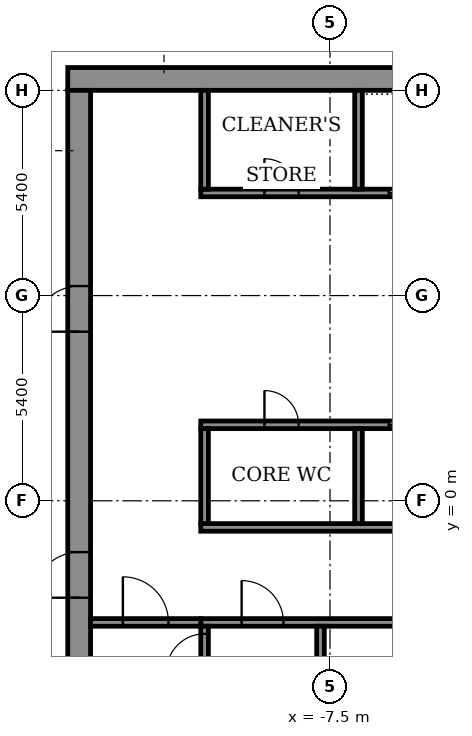
"""IFC4 building model, lengths in metres.
Left out: names, types, materials, properties, quantities, classifications, styles, units other than length and angle.
Written with IfcOpenShell. Run it as: python <this file> out.ifc"""

import sys

from ifc_helpers import new_model, si_unit, direction, frame, frame_2d, origin, place, context, subcontext, project, spatial, rectangle, extrude, element, fill, save


model = new_model("IFC4")
c1 = context("Model", 3, precision=1e-05, world=origin(), true_north=direction((0.0, 1.0)))
c2 = subcontext(c1, "Body", "Model", "MODEL_VIEW")
j1 = project(units=[si_unit("LENGTHUNIT", "METRE"), si_unit("PLANEANGLEUNIT", "RADIAN")], contexts=[c1])
p1 = place(None, origin())
s1 = spatial("IfcSite", under=j1, at=p1, CompositionType="ELEMENT")
p2 = place(p1, origin())
s2 = spatial("IfcBuilding", under=s1, at=p2, CompositionType="ELEMENT")
p3 = place(p2, frame((0.0, 0.0, 324.1)))
s3 = spatial("IfcBuildingStorey", under=s2, at=p3, CompositionType="ELEMENT", Elevation=324.1)
p4 = place(p3, frame((-14.4, 11.1, 0.0), z_axis=(0.0, 0.0, 1.0), x_axis=(1.0, 0.0, 0.0)))
e1 = element("IfcWall", 1, at=p4, inside=s3, PredefinedType="SHEAR", context=c2, shape_type="SweptSolid", body=[
    extrude(rectangle(XDim=28.8, YDim=0.6, at=frame_2d((14.4, 0.0))), origin(), (0.0, 0.0, 1.0), 5.6),
])
p5 = place(p3, frame((-14.1, -10.8, 0.0), z_axis=(0.0, 0.0, 1.0), x_axis=(0.0, 1.0, 0.0)))
e2 = element("IfcWall", 2, at=p5, inside=s3, PredefinedType="SHEAR", context=c2, shape_type="SweptSolid", body=[
    extrude(rectangle(XDim=21.6, YDim=0.6, at=frame_2d((10.8, 0.0))), origin(), (0.0, 0.0, 1.0), 5.6),
])
p6 = place(p5, frame((8.25, 0.0, 0.0)))
e3 = element("IfcOpeningElement", 3, at=p6, cuts=e2, PredefinedType="OPENING", context=c2, shape_type="SweptSolid", body=[
    extrude(rectangle(XDim=1.2, YDim=2.1, at=frame_2d((0.6, 1.05))), frame((0.0, 0.31, 0.0), z_axis=(0.0, -1.0, 0.0), x_axis=(1.0, 0.0, 0.0)), (0.0, 0.0, 1.0), 0.62),
])
p7 = place(p5, frame((15.25, 0.0, 0.0)))
e4 = element("IfcOpeningElement", 4, at=p7, cuts=e2, PredefinedType="OPENING", context=c2, shape_type="SweptSolid", body=[
    extrude(rectangle(XDim=1.2, YDim=2.1, at=frame_2d((0.6, 1.05))), frame((0.0, 0.31, 0.0), z_axis=(0.0, -1.0, 0.0), x_axis=(1.0, 0.0, 0.0)), (0.0, 0.0, 1.0), 0.62),
])
p8 = place(p5, frame((3.2, 0.0, 0.0)))
e5 = element("IfcOpeningElement", 5, at=p8, cuts=e2, PredefinedType="OPENING", context=c2, shape_type="SweptSolid", body=[
    extrude(rectangle(XDim=1.2, YDim=2.1, at=frame_2d((0.6, 1.05))), frame((0.0, 0.31, 0.0), z_axis=(0.0, -1.0, 0.0), x_axis=(1.0, 0.0, 0.0)), (0.0, 0.0, 1.0), 0.62),
])
p9 = place(p3, frame((-10.9, -3.2, 0.0), z_axis=(0.0, 0.0, 1.0), x_axis=(1.0, 0.0, 0.0)))
e6 = element("IfcWall", 6, at=p9, inside=s3, PredefinedType="SHEAR", context=c2, shape_type="SweptSolid", body=[
    extrude(rectangle(XDim=21.8, YDim=0.2, at=frame_2d((10.9, 0.0))), origin(), (0.0, 0.0, 1.0), 5.05),
])
p10 = place(p9, frame((1.075, 0.0, 0.0)))
e7 = element("IfcOpeningElement", 7, at=p10, cuts=e6, PredefinedType="OPENING", context=c2, shape_type="SweptSolid", body=[
    extrude(rectangle(XDim=1.1, YDim=2.1, at=frame_2d((0.55, 1.05))), frame((0.0, 0.11, 0.0), z_axis=(0.0, -1.0, 0.0), x_axis=(1.0, 0.0, 0.0)), (0.0, 0.0, 1.0), 0.22),
])
p11 = place(p9, frame((10.325, 0.0, 0.0)))
e8 = element("IfcOpeningElement", 8, at=p11, cuts=e6, PredefinedType="OPENING", context=c2, shape_type="SweptSolid", body=[
    extrude(rectangle(XDim=1.1, YDim=2.1, at=frame_2d((0.55, 1.05))), frame((0.0, 0.11, 0.0), z_axis=(0.0, -1.0, 0.0), x_axis=(1.0, 0.0, 0.0)), (0.0, 0.0, 1.0), 0.22),
])
p12 = place(p9, frame((19.625, 0.0, 0.0)))
e9 = element("IfcOpeningElement", 9, at=p12, cuts=e6, PredefinedType="OPENING", context=c2, shape_type="SweptSolid", body=[
    extrude(rectangle(XDim=1.1, YDim=2.1, at=frame_2d((0.55, 1.05))), frame((0.0, 0.11, 0.0), z_axis=(0.0, -1.0, 0.0), x_axis=(1.0, 0.0, 0.0)), (0.0, 0.0, 1.0), 0.22),
])
p13 = place(p9, frame((5.7, 0.0, 0.0)))
e10 = element("IfcOpeningElement", 10, at=p13, cuts=e6, PredefinedType="OPENING", context=c2, shape_type="SweptSolid", body=[
    extrude(rectangle(XDim=1.1, YDim=2.1, at=frame_2d((0.55, 1.05))), frame((0.0, 0.11, 0.0), z_axis=(0.0, -1.0, 0.0), x_axis=(1.0, 0.0, 0.0)), (0.0, 0.0, 1.0), 0.22),
])
p14 = place(p9, frame((14.975, 0.0, 0.0)))
e11 = element("IfcOpeningElement", 11, at=p14, cuts=e6, PredefinedType="OPENING", context=c2, shape_type="SweptSolid", body=[
    extrude(rectangle(XDim=1.1, YDim=2.1, at=frame_2d((0.55, 1.05))), frame((0.0, 0.11, 0.0), z_axis=(0.0, -1.0, 0.0), x_axis=(1.0, 0.0, 0.0)), (0.0, 0.0, 1.0), 0.22),
])
p15 = place(p3, frame((-10.9, -0.7, 0.0), z_axis=(0.0, 0.0, 1.0), x_axis=(1.0, 0.0, 0.0)))
e12 = element("IfcWall", 12, at=p15, inside=s3, PredefinedType="SHEAR", context=c2, shape_type="SweptSolid", body=[
    extrude(rectangle(XDim=21.8, YDim=0.2, at=frame_2d((10.9, 0.0))), origin(), (0.0, 0.0, 1.0), 5.05),
])
p16 = place(p3, frame((-10.9, 2.0, 0.0), z_axis=(0.0, 0.0, 1.0), x_axis=(1.0, 0.0, 0.0)))
e13 = element("IfcWall", 13, at=p16, inside=s3, PredefinedType="SHEAR", context=c2, shape_type="SweptSolid", body=[
    extrude(rectangle(XDim=21.8, YDim=0.2, at=frame_2d((10.9, 0.0))), origin(), (0.0, 0.0, 1.0), 5.05),
])
p17 = place(p16, frame((4.95, 0.0, 0.0)))
e14 = element("IfcOpeningElement", 14, at=p17, cuts=e13, PredefinedType="OPENING", context=c2, shape_type="SweptSolid", body=[
    extrude(rectangle(XDim=1.1, YDim=2.1, at=frame_2d((0.55, 1.05))), frame((0.0, 0.11, 0.0), z_axis=(0.0, -1.0, 0.0), x_axis=(1.0, 0.0, 0.0)), (0.0, 0.0, 1.0), 0.22),
])
p18 = place(p16, frame((7.65, 0.0, 0.0)))
e15 = element("IfcOpeningElement", 15, at=p18, cuts=e13, PredefinedType="OPENING", context=c2, shape_type="SweptSolid", body=[
    extrude(rectangle(XDim=1.1, YDim=2.1, at=frame_2d((0.55, 1.05))), frame((0.0, 0.11, 0.0), z_axis=(0.0, -1.0, 0.0), x_axis=(1.0, 0.0, 0.0)), (0.0, 0.0, 1.0), 0.22),
])
p19 = place(p16, frame((10.35, 0.0, 0.0)))
e16 = element("IfcOpeningElement", 16, at=p19, cuts=e13, PredefinedType="OPENING", context=c2, shape_type="SweptSolid", body=[
    extrude(rectangle(XDim=1.1, YDim=2.1, at=frame_2d((0.55, 1.05))), frame((0.0, 0.11, 0.0), z_axis=(0.0, -1.0, 0.0), x_axis=(1.0, 0.0, 0.0)), (0.0, 0.0, 1.0), 0.22),
])
p20 = place(p16, frame((1.675, 0.0, 0.0)))
e17 = element("IfcOpeningElement", 17, at=p20, cuts=e13, PredefinedType="OPENING", context=c2, shape_type="SweptSolid", body=[
    extrude(rectangle(XDim=0.9, YDim=2.1, at=frame_2d((0.45, 1.05))), frame((0.0, 0.11, 0.0), z_axis=(0.0, -1.0, 0.0), x_axis=(1.0, 0.0, 0.0)), (0.0, 0.0, 1.0), 0.22),
])
p21 = place(p16, frame((16.525, 0.0, 0.0)))
e18 = element("IfcOpeningElement", 18, at=p21, cuts=e13, PredefinedType="OPENING", context=c2, shape_type="SweptSolid", body=[
    extrude(rectangle(XDim=0.9, YDim=2.1, at=frame_2d((0.45, 1.05))), frame((0.0, 0.11, 0.0), z_axis=(0.0, -1.0, 0.0), x_axis=(1.0, 0.0, 0.0)), (0.0, 0.0, 1.0), 0.22),
])
p22 = place(p3, frame((-10.9, 8.1, 0.0), z_axis=(0.0, 0.0, 1.0), x_axis=(1.0, 0.0, 0.0)))
e19 = element("IfcWall", 19, at=p22, inside=s3, PredefinedType="SHEAR", context=c2, shape_type="SweptSolid", body=[
    extrude(rectangle(XDim=21.8, YDim=0.2, at=frame_2d((10.9, 0.0))), origin(), (0.0, 0.0, 1.0), 5.05),
])
p23 = place(p22, frame((4.95, 0.0, 0.0)))
e20 = element("IfcOpeningElement", 20, at=p23, cuts=e19, PredefinedType="OPENING", context=c2, shape_type="SweptSolid", body=[
    extrude(rectangle(XDim=1.1, YDim=2.1, at=frame_2d((0.55, 1.05))), frame((0.0, 0.11, 0.0), z_axis=(0.0, -1.0, 0.0), x_axis=(1.0, 0.0, 0.0)), (0.0, 0.0, 1.0), 0.22),
])
p24 = place(p22, frame((7.65, 0.0, 0.0)))
e21 = element("IfcOpeningElement", 21, at=p24, cuts=e19, PredefinedType="OPENING", context=c2, shape_type="SweptSolid", body=[
    extrude(rectangle(XDim=1.1, YDim=2.1, at=frame_2d((0.55, 1.05))), frame((0.0, 0.11, 0.0), z_axis=(0.0, -1.0, 0.0), x_axis=(1.0, 0.0, 0.0)), (0.0, 0.0, 1.0), 0.22),
])
p25 = place(p22, frame((10.35, 0.0, 0.0)))
e22 = element("IfcOpeningElement", 22, at=p25, cuts=e19, PredefinedType="OPENING", context=c2, shape_type="SweptSolid", body=[
    extrude(rectangle(XDim=1.1, YDim=2.1, at=frame_2d((0.55, 1.05))), frame((0.0, 0.11, 0.0), z_axis=(0.0, -1.0, 0.0), x_axis=(1.0, 0.0, 0.0)), (0.0, 0.0, 1.0), 0.22),
])
p26 = place(p22, frame((1.675, 0.0, 0.0)))
e23 = element("IfcOpeningElement", 23, at=p26, cuts=e19, PredefinedType="OPENING", context=c2, shape_type="SweptSolid", body=[
    extrude(rectangle(XDim=0.9, YDim=2.1, at=frame_2d((0.45, 1.05))), frame((0.0, 0.11, 0.0), z_axis=(0.0, -1.0, 0.0), x_axis=(1.0, 0.0, 0.0)), (0.0, 0.0, 1.0), 0.22),
])
p27 = place(p22, frame((13.825, 0.0, 0.0)))
e24 = element("IfcOpeningElement", 24, at=p27, cuts=e19, PredefinedType="OPENING", context=c2, shape_type="SweptSolid", body=[
    extrude(rectangle(XDim=0.9, YDim=2.1, at=frame_2d((0.45, 1.05))), frame((0.0, 0.11, 0.0), z_axis=(0.0, -1.0, 0.0), x_axis=(1.0, 0.0, 0.0)), (0.0, 0.0, 1.0), 0.22),
])
p28 = place(p22, frame((18.55, 0.0, 0.0)))
e25 = element("IfcOpeningElement", 25, at=p28, cuts=e19, PredefinedType="OPENING", context=c2, shape_type="SweptSolid", body=[
    extrude(rectangle(XDim=0.9, YDim=2.1, at=frame_2d((0.45, 1.05))), frame((0.0, 0.11, 0.0), z_axis=(0.0, -1.0, 0.0), x_axis=(1.0, 0.0, 0.0)), (0.0, 0.0, 1.0), 0.22),
])
p29 = place(p3, frame((-10.8, -10.8, 0.0), z_axis=(0.0, 0.0, 1.0), x_axis=(0.0, 1.0, 0.0)))
e26 = element("IfcWall", 26, at=p29, inside=s3, PredefinedType="SHEAR", context=c2, shape_type="SweptSolid", body=[
    extrude(rectangle(XDim=7.5, YDim=0.2, at=frame_2d((3.75, 0.0))), origin(), (0.0, 0.0, 1.0), 5.05),
])
p30 = place(p29, frame((6.3, 0.0, 0.0)))
e27 = element("IfcOpeningElement", 27, at=p30, cuts=e26, PredefinedType="OPENING", context=c2, shape_type="SweptSolid", body=[
    extrude(rectangle(XDim=1.0, YDim=2.1, at=frame_2d((0.5, 1.05))), frame((0.0, 0.11, 0.0), z_axis=(0.0, -1.0, 0.0), x_axis=(1.0, 0.0, 0.0)), (0.0, 0.0, 1.0), 0.22),
])
p31 = place(p3, frame((-7.75, -10.8, 0.0), z_axis=(0.0, 0.0, 1.0), x_axis=(0.0, 1.0, 0.0)))
e28 = element("IfcWall", 28, at=p31, inside=s3, PredefinedType="SHEAR", context=c2, shape_type="SweptSolid", body=[
    extrude(rectangle(XDim=7.5, YDim=0.2, at=frame_2d((3.75, 0.0))), origin(), (0.0, 0.0, 1.0), 5.05),
])
p32 = place(p3, frame((-10.8, -0.6, 0.0), z_axis=(0.0, 0.0, 1.0), x_axis=(0.0, 1.0, 0.0)))
e29 = element("IfcWall", 29, at=p32, inside=s3, PredefinedType="STANDARD", context=c2, shape_type="SweptSolid", body=[
    extrude(rectangle(XDim=2.5, YDim=0.2, at=frame_2d((1.25, 0.0))), origin(), (0.0, 0.0, 1.0), 5.05),
])
p33 = place(p3, frame((-6.75, -0.6, 0.0), z_axis=(0.0, 0.0, 1.0), x_axis=(0.0, 1.0, 0.0)))
e30 = element("IfcWall", 30, at=p33, inside=s3, PredefinedType="SHEAR", context=c2, shape_type="SweptSolid", body=[
    extrude(rectangle(XDim=2.5, YDim=0.2, at=frame_2d((1.25, 0.0))), origin(), (0.0, 0.0, 1.0), 5.05),
])
p34 = place(p3, frame((-10.8, 8.2, 0.0), z_axis=(0.0, 0.0, 1.0), x_axis=(0.0, 1.0, 0.0)))
e31 = element("IfcWall", 31, at=p34, inside=s3, PredefinedType="STANDARD", context=c2, shape_type="SweptSolid", body=[
    extrude(rectangle(XDim=2.6, YDim=0.2, at=frame_2d((1.3, 0.0))), origin(), (0.0, 0.0, 1.0), 5.05),
])
p35 = place(p3, frame((-6.75, 8.2, 0.0), z_axis=(0.0, 0.0, 1.0), x_axis=(0.0, 1.0, 0.0)))
e32 = element("IfcWall", 32, at=p35, inside=s3, PredefinedType="SHEAR", context=c2, shape_type="SweptSolid", body=[
    extrude(rectangle(XDim=2.6, YDim=0.2, at=frame_2d((1.3, 0.0))), origin(), (0.0, 0.0, 1.0), 5.05),
])
p36 = place(p3, frame((-13.8, -3.2, 0.0), z_axis=(0.0, 0.0, 1.0), x_axis=(1.0, 0.0, 0.0)))
e33 = element("IfcWall", 33, at=p36, inside=s3, PredefinedType="STANDARD", context=c2, shape_type="SweptSolid", body=[
    extrude(rectangle(XDim=2.9, YDim=0.2, at=frame_2d((1.45, 0.0))), origin(), (0.0, 0.0, 1.0), 5.05),
])
p37 = place(p36, frame((0.85, 0.0, 0.0)))
e34 = element("IfcOpeningElement", 34, at=p37, cuts=e33, PredefinedType="OPENING", context=c2, shape_type="SweptSolid", body=[
    extrude(rectangle(XDim=1.2, YDim=2.1, at=frame_2d((0.6, 1.05))), frame((0.0, 0.11, 0.0), z_axis=(0.0, -1.0, 0.0), x_axis=(1.0, 0.0, 0.0)), (0.0, 0.0, 1.0), 0.22),
])
p38 = place(p6, origin())
e35 = element("IfcDoor", 35, at=p38, inside=s3, OperationType="DOUBLE_DOOR_SINGLE_SWING", PredefinedType="DOOR", context=c2, shape_type="SweptSolid", body=[
    extrude(rectangle(XDim=1.2, YDim=2.1, at=frame_2d((0.6, 1.05))), frame((0.0, 0.025, 0.0), z_axis=(0.0, -1.0, 0.0), x_axis=(1.0, 0.0, 0.0)), (0.0, 0.0, 1.0), 0.05),
])
fill(e3, e35)
p39 = place(p7, origin())
e36 = element("IfcDoor", 36, at=p39, inside=s3, OperationType="DOUBLE_DOOR_SINGLE_SWING", PredefinedType="DOOR", context=c2, shape_type="SweptSolid", body=[
    extrude(rectangle(XDim=1.2, YDim=2.1, at=frame_2d((0.6, 1.05))), frame((0.0, 0.025, 0.0), z_axis=(0.0, -1.0, 0.0), x_axis=(1.0, 0.0, 0.0)), (0.0, 0.0, 1.0), 0.05),
])
fill(e4, e36)
p40 = place(p17, origin())
e37 = element("IfcDoor", 37, at=p40, inside=s3, OperationType="SLIDING_TO_LEFT", PredefinedType="DOOR", context=c2, shape_type="SweptSolid", body=[
    extrude(rectangle(XDim=1.1, YDim=2.1, at=frame_2d((0.55, 1.05))), frame((0.0, 0.025, 0.0), z_axis=(0.0, -1.0, 0.0), x_axis=(1.0, 0.0, 0.0)), (0.0, 0.0, 1.0), 0.05),
])
fill(e14, e37)
p41 = place(p23, origin())
e38 = element("IfcDoor", 38, at=p41, inside=s3, OperationType="SLIDING_TO_LEFT", PredefinedType="DOOR", context=c2, shape_type="SweptSolid", body=[
    extrude(rectangle(XDim=1.1, YDim=2.1, at=frame_2d((0.55, 1.05))), frame((0.0, 0.025, 0.0), z_axis=(0.0, -1.0, 0.0), x_axis=(1.0, 0.0, 0.0)), (0.0, 0.0, 1.0), 0.05),
])
fill(e20, e38)
p42 = place(p20, origin())
e39 = element("IfcDoor", 39, at=p42, inside=s3, OperationType="SINGLE_SWING_RIGHT", PredefinedType="DOOR", context=c2, shape_type="SweptSolid", body=[
    extrude(rectangle(XDim=0.9, YDim=2.1, at=frame_2d((0.45, 1.05))), frame((0.0, 0.025, 0.0), z_axis=(0.0, -1.0, 0.0), x_axis=(1.0, 0.0, 0.0)), (0.0, 0.0, 1.0), 0.05),
])
fill(e17, e39)
p43 = place(p26, origin())
e40 = element("IfcDoor", 40, at=p43, inside=s3, OperationType="SINGLE_SWING_RIGHT", PredefinedType="DOOR", context=c2, shape_type="SweptSolid", body=[
    extrude(rectangle(XDim=0.9, YDim=2.1, at=frame_2d((0.45, 1.05))), frame((0.0, 0.025, 0.0), z_axis=(0.0, -1.0, 0.0), x_axis=(1.0, 0.0, 0.0)), (0.0, 0.0, 1.0), 0.05),
])
fill(e23, e40)
p44 = place(p10, origin())
e41 = element("IfcDoor", 41, at=p44, inside=s3, OperationType="SINGLE_SWING_RIGHT", PredefinedType="DOOR", context=c2, shape_type="SweptSolid", body=[
    extrude(rectangle(XDim=1.1, YDim=2.1, at=frame_2d((0.55, 1.05))), frame((0.0, 0.025, 0.0), z_axis=(0.0, -1.0, 0.0), x_axis=(1.0, 0.0, 0.0)), (0.0, 0.0, 1.0), 0.05),
])
fill(e7, e41)
p45 = place(p37, origin())
e42 = element("IfcDoor", 42, at=p45, inside=s3, OperationType="SINGLE_SWING_LEFT", PredefinedType="DOOR", context=c2, shape_type="SweptSolid", body=[
    extrude(rectangle(XDim=1.2, YDim=2.1, at=frame_2d((0.6, 1.05))), frame((0.0, 0.025, 0.0), z_axis=(0.0, -1.0, 0.0), x_axis=(1.0, 0.0, 0.0)), (0.0, 0.0, 1.0), 0.05),
])
fill(e34, e42)
p46 = place(p30, origin())
e43 = element("IfcDoor", 43, at=p46, inside=s3, OperationType="SINGLE_SWING_RIGHT", PredefinedType="DOOR", context=c2, shape_type="SweptSolid", body=[
    extrude(rectangle(XDim=1.0, YDim=2.1, at=frame_2d((0.5, 1.05))), frame((0.0, 0.025, 0.0), z_axis=(0.0, -1.0, 0.0), x_axis=(1.0, 0.0, 0.0)), (0.0, 0.0, 1.0), 0.05),
])
fill(e27, e43)
save(model, sys.argv[1])
